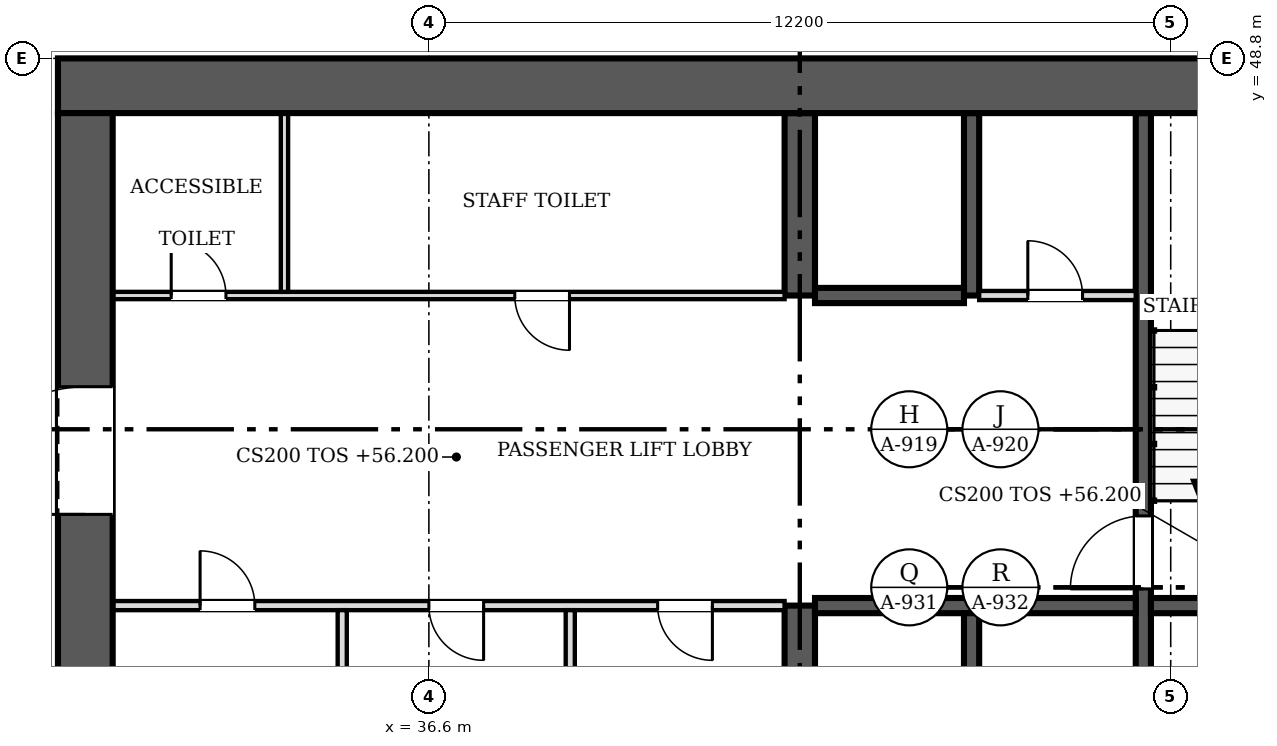
"""IFC4 building model, lengths in metres.
Left out: names, types, materials, properties, quantities, classifications, styles, units other than length and angle.
Written with IfcOpenShell. Run it as: python <this file> out.ifc"""

import sys

from ifc_helpers import new_model, si_unit, direction, frame, frame_2d, origin, place, context, subcontext, project, spatial, rectangle, extrude, source, transform, mapped, element, fill, save


model = new_model("IFC4")
c1 = context("Model", 3, precision=1e-05, world=origin(), true_north=direction((0.0, 1.0)))
c2 = subcontext(c1, "Body", "Model", "MODEL_VIEW")
j1 = project(units=[si_unit("LENGTHUNIT", "METRE"), si_unit("PLANEANGLEUNIT", "RADIAN")], contexts=[c1])
p1 = place(None, origin())
s1 = spatial("IfcSite", under=j1, at=p1, CompositionType="ELEMENT")
p2 = place(p1, origin())
s2 = spatial("IfcBuilding", under=s1, at=p2, CompositionType="ELEMENT")
p3 = place(p2, frame((0.0, 0.0, 56.2)))
s3 = spatial("IfcBuildingStorey", under=s2, at=p3, CompositionType="ELEMENT", Elevation=56.2)
p4 = place(p3, frame((30.95, 25.3, 0.0), z_axis=(0.0, 0.0, 1.0), x_axis=(0.0, 1.0, 0.0)))
e1 = element("IfcWall", 1, at=p4, inside=s3, PredefinedType="SHEAR", context=c2, shape_type="SweptSolid", body=[
    extrude(rectangle(XDim=22.6, YDim=0.9, at=frame_2d((11.3, 0.0))), origin(), (0.0, 0.0, 1.0), 3.8),
])
m1 = source(origin(), c2, "Body", "SweptSolid", [
    extrude(rectangle(XDim=2.1, YDim=2.4, at=frame_2d((1.05, 1.2))), frame((0.0, 0.46, 0.0), z_axis=(0.0, -1.0, 0.0), x_axis=(1.0, 0.0, 0.0)), (0.0, 0.0, 1.0), 0.92),
])
p5 = place(p4, frame((4.5, 0.0, 0.0)))
e2 = element("IfcOpeningElement", 2, at=p5, cuts=e1, PredefinedType="OPENING", context=c2, shape_type="MappedRepresentation", body=[
    mapped(m1, transform((0.0, 0.0, 0.0), scale=1.0)),
])
p6 = place(p4, frame((16.0, 0.0, 0.0)))
e3 = element("IfcOpeningElement", 3, at=p6, cuts=e1, PredefinedType="OPENING", context=c2, shape_type="MappedRepresentation", body=[
    mapped(m1, transform((0.0, 0.0, 0.0), scale=1.0)),
])
p7 = place(p3, frame((30.5, 48.35, 0.0), z_axis=(0.0, 0.0, 1.0), x_axis=(1.0, 0.0, 0.0)))
e4 = element("IfcWall", 4, at=p7, inside=s3, PredefinedType="SHEAR", context=c2, shape_type="SweptSolid", body=[
    extrude(rectangle(XDim=24.4, YDim=0.9, at=frame_2d((12.2, 0.0))), origin(), (0.0, 0.0, 1.0), 3.8),
])
p8 = place(p3, frame((42.7, 36.85, 0.0), z_axis=(0.0, 0.0, 1.0), x_axis=(0.0, 1.0, 0.0)))
e5 = element("IfcWall", 5, at=p8, inside=s3, PredefinedType="SHEAR", context=c2, shape_type="SweptSolid", body=[
    extrude(rectangle(XDim=2.95, YDim=0.5, at=frame_2d((1.475, 0.0))), origin(), (0.0, 0.0, 1.0), 3.8),
])
p9 = place(p3, frame((42.7, 44.9, 0.0), z_axis=(0.0, 0.0, 1.0), x_axis=(0.0, 1.0, 0.0)))
e6 = element("IfcWall", 6, at=p9, inside=s3, PredefinedType="SHEAR", context=c2, shape_type="SweptSolid", body=[
    extrude(rectangle(XDim=3.0, YDim=0.5, at=frame_2d((1.5, 0.0))), origin(), (0.0, 0.0, 1.0), 3.8),
])
p10 = place(p3, frame((48.35, 47.9, 0.0), z_axis=(0.0, 0.0, 1.0), x_axis=(0.0, -1.0, 0.0)))
e7 = element("IfcWall", 7, at=p10, inside=s3, PredefinedType="SOLIDWALL", context=c2, shape_type="SweptSolid", body=[
    extrude(rectangle(XDim=11.05, YDim=0.25, at=frame_2d((5.525, 0.0))), origin(), (0.0, 0.0, 1.0), 3.8),
])
m2 = source(origin(), c2, "Body", "SweptSolid", [
    extrude(rectangle(XDim=1.2, YDim=2.1, at=frame_2d((0.6, 1.05))), frame((0.0, 0.135, 0.0), z_axis=(0.0, -1.0, 0.0), x_axis=(1.0, 0.0, 0.0)), (0.0, 0.0, 1.0), 0.27),
])
p11 = place(p10, frame((6.625, 0.0, 0.0)))
e8 = element("IfcOpeningElement", 8, at=p11, cuts=e7, PredefinedType="OPENING", context=c2, shape_type="MappedRepresentation", body=[
    mapped(m2, transform((0.0, 0.0, 0.0), scale=1.0)),
])
p12 = place(p3, frame((42.95, 39.8, 0.0), z_axis=(0.0, 0.0, 1.0), x_axis=(1.0, 0.0, 0.0)))
e9 = element("IfcWall", 9, at=p12, inside=s3, PredefinedType="SOLIDWALL", context=c2, shape_type="SweptSolid", body=[
    extrude(rectangle(XDim=5.275, YDim=0.25, at=frame_2d((2.638, 0.0))), origin(), (0.0, 0.0, 1.0), 3.8),
])
p13 = place(p3, frame((48.475, 39.8, 0.0), z_axis=(0.0, 0.0, 1.0), x_axis=(1.0, 0.0, 0.0)))
e10 = element("IfcWall", 10, at=p13, inside=s3, PredefinedType="SOLIDWALL", context=c2, shape_type="SweptSolid", body=[
    extrude(rectangle(XDim=3.525, YDim=0.25, at=frame_2d((1.762, 0.0))), origin(), (0.0, 0.0, 1.0), 3.8),
])
p14 = place(p3, frame((45.525, 36.85, 0.0), z_axis=(0.0, 0.0, 1.0), x_axis=(0.0, 1.0, 0.0)))
e11 = element("IfcWall", 11, at=p14, inside=s3, PredefinedType="SOLIDWALL", context=c2, shape_type="SweptSolid", body=[
    extrude(rectangle(XDim=2.825, YDim=0.25, at=frame_2d((1.413, 0.0))), origin(), (0.0, 0.0, 1.0), 3.8),
])
p15 = place(p3, frame((45.525, 44.9, 0.0), z_axis=(0.0, 0.0, 1.0), x_axis=(0.0, 1.0, 0.0)))
e12 = element("IfcWall", 12, at=p15, inside=s3, PredefinedType="SOLIDWALL", context=c2, shape_type="SweptSolid", body=[
    extrude(rectangle(XDim=3.0, YDim=0.25, at=frame_2d((1.5, 0.0))), origin(), (0.0, 0.0, 1.0), 3.8),
])
p16 = place(p3, frame((42.95, 44.9, 0.0), z_axis=(0.0, 0.0, 1.0), x_axis=(1.0, 0.0, 0.0)))
e13 = element("IfcWall", 13, at=p16, inside=s3, PredefinedType="SOLIDWALL", context=c2, shape_type="SweptSolid", body=[
    extrude(rectangle(XDim=2.45, YDim=0.25, at=frame_2d((1.225, 0.0))), origin(), (0.0, 0.0, 1.0), 3.8),
])
p17 = place(p3, frame((42.45, 39.8, 0.0), z_axis=(0.0, 0.0, 1.0), x_axis=(-1.0, 0.0, 0.0)))
e14 = element("IfcWall", 14, at=p17, inside=s3, PredefinedType="PARTITIONING", context=c2, shape_type="SweptSolid", body=[
    extrude(rectangle(XDim=11.05, YDim=0.15, at=frame_2d((5.525, 0.0))), origin(), (0.0, 0.0, 1.0), 3.6),
])
m3 = source(origin(), c2, "Body", "SweptSolid", [
    extrude(rectangle(XDim=0.9, YDim=2.1, at=frame_2d((0.45, 1.05))), frame((0.0, 0.085, 0.0), z_axis=(0.0, -1.0, 0.0), x_axis=(1.0, 0.0, 0.0)), (0.0, 0.0, 1.0), 0.17),
])
p18 = place(p17, frame((8.712, 0.0, 0.0)))
e15 = element("IfcOpeningElement", 15, at=p18, cuts=e14, PredefinedType="OPENING", context=c2, shape_type="MappedRepresentation", body=[
    mapped(m3, transform((0.0, 0.0, 0.0), scale=1.0)),
])
p19 = place(p17, frame((4.95, 0.0, 0.0)))
e16 = element("IfcOpeningElement", 16, at=p19, cuts=e14, PredefinedType="OPENING", context=c2, shape_type="MappedRepresentation", body=[
    mapped(m3, transform((0.0, 0.0, 0.0), scale=1.0)),
])
p20 = place(p17, frame((1.188, 0.0, 0.0)))
e17 = element("IfcOpeningElement", 17, at=p20, cuts=e14, PredefinedType="OPENING", context=c2, shape_type="MappedRepresentation", body=[
    mapped(m3, transform((0.0, 0.0, 0.0), scale=1.0)),
])
p21 = place(p3, frame((31.4, 44.9, 0.0), z_axis=(0.0, 0.0, 1.0), x_axis=(1.0, 0.0, 0.0)))
e18 = element("IfcWall", 18, at=p21, inside=s3, PredefinedType="PARTITIONING", context=c2, shape_type="SweptSolid", body=[
    extrude(rectangle(XDim=11.05, YDim=0.12, at=frame_2d((5.525, 0.0))), origin(), (0.0, 0.0, 1.0), 3.6),
])
m4 = source(origin(), c2, "Body", "SweptSolid", [
    extrude(rectangle(XDim=0.9, YDim=2.1, at=frame_2d((0.45, 1.05))), frame((0.0, 0.07, 0.0), z_axis=(0.0, -1.0, 0.0), x_axis=(1.0, 0.0, 0.0)), (0.0, 0.0, 1.0), 0.14),
])
p22 = place(p21, frame((0.962, 0.0, 0.0)))
e19 = element("IfcOpeningElement", 19, at=p22, cuts=e18, PredefinedType="OPENING", context=c2, shape_type="MappedRepresentation", body=[
    mapped(m4, transform((0.0, 0.0, 0.0), scale=1.0)),
])
p23 = place(p21, frame((6.613, 0.0, 0.0)))
e20 = element("IfcOpeningElement", 20, at=p23, cuts=e18, PredefinedType="OPENING", context=c2, shape_type="MappedRepresentation", body=[
    mapped(m4, transform((0.0, 0.0, 0.0), scale=1.0)),
])
for number, where, z_axis, x_axis in (
    (21, (35.175, 36.85, 0.0), (0.0, 0.0, 1.0), (0.0, 1.0, 0.0)),
    (22, (38.925, 36.85, 0.0), (0.0, 0.0, 1.0), (0.0, 1.0, 0.0)),
):
    element("IfcWall", number, at=place(p3, frame(where, z_axis=z_axis, x_axis=x_axis)), inside=s3, PredefinedType="PARTITIONING", context=c2, shape_type="SweptSolid", body=[
        extrude(rectangle(XDim=2.875, YDim=0.15, at=frame_2d((1.438, 0.0))), origin(), (0.0, 0.0, 1.0), 3.6),
    ])
p24 = place(p3, frame((34.225, 44.96, 0.0), z_axis=(0.0, 0.0, 1.0), x_axis=(0.0, 1.0, 0.0)))
e23 = element("IfcWall", 23, at=p24, inside=s3, PredefinedType="PARTITIONING", context=c2, shape_type="SweptSolid", body=[
    extrude(rectangle(XDim=2.94, YDim=0.12, at=frame_2d((1.47, 0.0))), origin(), (0.0, 0.0, 1.0), 3.6),
])
p25 = place(p3, frame((45.65, 44.9, 0.0), z_axis=(0.0, 0.0, 1.0), x_axis=(1.0, 0.0, 0.0)))
e24 = element("IfcWall", 24, at=p25, inside=s3, PredefinedType="PARTITIONING", context=c2, shape_type="SweptSolid", body=[
    extrude(rectangle(XDim=2.575, YDim=0.15, at=frame_2d((1.288, 0.0))), origin(), (0.0, 0.0, 1.0), 3.6),
])
p26 = place(p25, frame((0.8, 0.0, 0.0)))
e25 = element("IfcOpeningElement", 25, at=p26, cuts=e24, PredefinedType="OPENING", context=c2, shape_type="MappedRepresentation", body=[
    mapped(m3, transform((0.0, 0.0, 0.0), scale=1.0)),
])
m5 = source(origin(), c2, "Body", "SweptSolid", [
    extrude(rectangle(XDim=2.1, YDim=2.4, at=frame_2d((1.05, 1.2))), frame((0.0, 0.025, 0.0), z_axis=(0.0, -1.0, 0.0), x_axis=(1.0, 0.0, 0.0)), (0.0, 0.0, 1.0), 0.05),
])
p27 = place(p6, origin())
e26 = element("IfcDoor", 26, at=p27, inside=s3, OperationType="DOUBLE_DOOR_SINGLE_SWING", PredefinedType="DOOR", context=c2, shape_type="MappedRepresentation", body=[
    mapped(m5, transform((0.0, 0.0, 0.0), scale=1.0)),
])
fill(e3, e26)
m6 = source(origin(), c2, "Body", "SweptSolid", [
    extrude(rectangle(XDim=1.2, YDim=2.1, at=frame_2d((0.6, 1.05))), frame((0.0, 0.025, 0.0), z_axis=(0.0, -1.0, 0.0), x_axis=(1.0, 0.0, 0.0)), (0.0, 0.0, 1.0), 0.05),
])
p28 = place(p11, origin())
e27 = element("IfcDoor", 27, at=p28, inside=s3, OperationType="SINGLE_SWING_RIGHT", PredefinedType="DOOR", context=c2, shape_type="MappedRepresentation", body=[
    mapped(m6, transform((0.0, 0.0, 0.0), scale=1.0)),
])
fill(e8, e27)
m7 = source(origin(), c2, "Body", "SweptSolid", [
    extrude(rectangle(XDim=0.9, YDim=2.1, at=frame_2d((0.45, 1.05))), frame((0.0, 0.025, 0.0), z_axis=(0.0, -1.0, 0.0), x_axis=(1.0, 0.0, 0.0)), (0.0, 0.0, 1.0), 0.05),
])
p29 = place(p18, origin())
e28 = element("IfcDoor", 28, at=p29, inside=s3, OperationType="SINGLE_SWING_RIGHT", PredefinedType="DOOR", context=c2, shape_type="MappedRepresentation", body=[
    mapped(m7, transform((0.0, 0.0, 0.0), scale=1.0)),
])
fill(e15, e28)
p30 = place(p19, origin())
e29 = element("IfcDoor", 29, at=p30, inside=s3, OperationType="SINGLE_SWING_LEFT", PredefinedType="DOOR", context=c2, shape_type="MappedRepresentation", body=[
    mapped(m7, transform((0.0, 0.0, 0.0), scale=1.0)),
])
fill(e16, e29)
p31 = place(p20, origin())
e30 = element("IfcDoor", 30, at=p31, inside=s3, OperationType="SINGLE_SWING_LEFT", PredefinedType="DOOR", context=c2, shape_type="MappedRepresentation", body=[
    mapped(m7, transform((0.0, 0.0, 0.0), scale=1.0)),
])
fill(e17, e30)
p32 = place(p22, origin())
e31 = element("IfcDoor", 31, at=p32, inside=s3, OperationType="SINGLE_SWING_LEFT", PredefinedType="DOOR", context=c2, shape_type="MappedRepresentation", body=[
    mapped(m7, transform((0.0, 0.0, 0.0), scale=1.0)),
])
fill(e19, e31)
p33 = place(p23, origin())
e32 = element("IfcDoor", 32, at=p33, inside=s3, OperationType="SINGLE_SWING_RIGHT", PredefinedType="DOOR", context=c2, shape_type="MappedRepresentation", body=[
    mapped(m7, transform((0.0, 0.0, 0.0), scale=1.0)),
])
fill(e20, e32)
p34 = place(p26, origin())
e33 = element("IfcDoor", 33, at=p34, inside=s3, OperationType="SINGLE_SWING_LEFT", PredefinedType="DOOR", context=c2, shape_type="MappedRepresentation", body=[
    mapped(m7, transform((0.0, 0.0, 0.0), scale=1.0)),
])
fill(e25, e33)
save(model, sys.argv[1])
